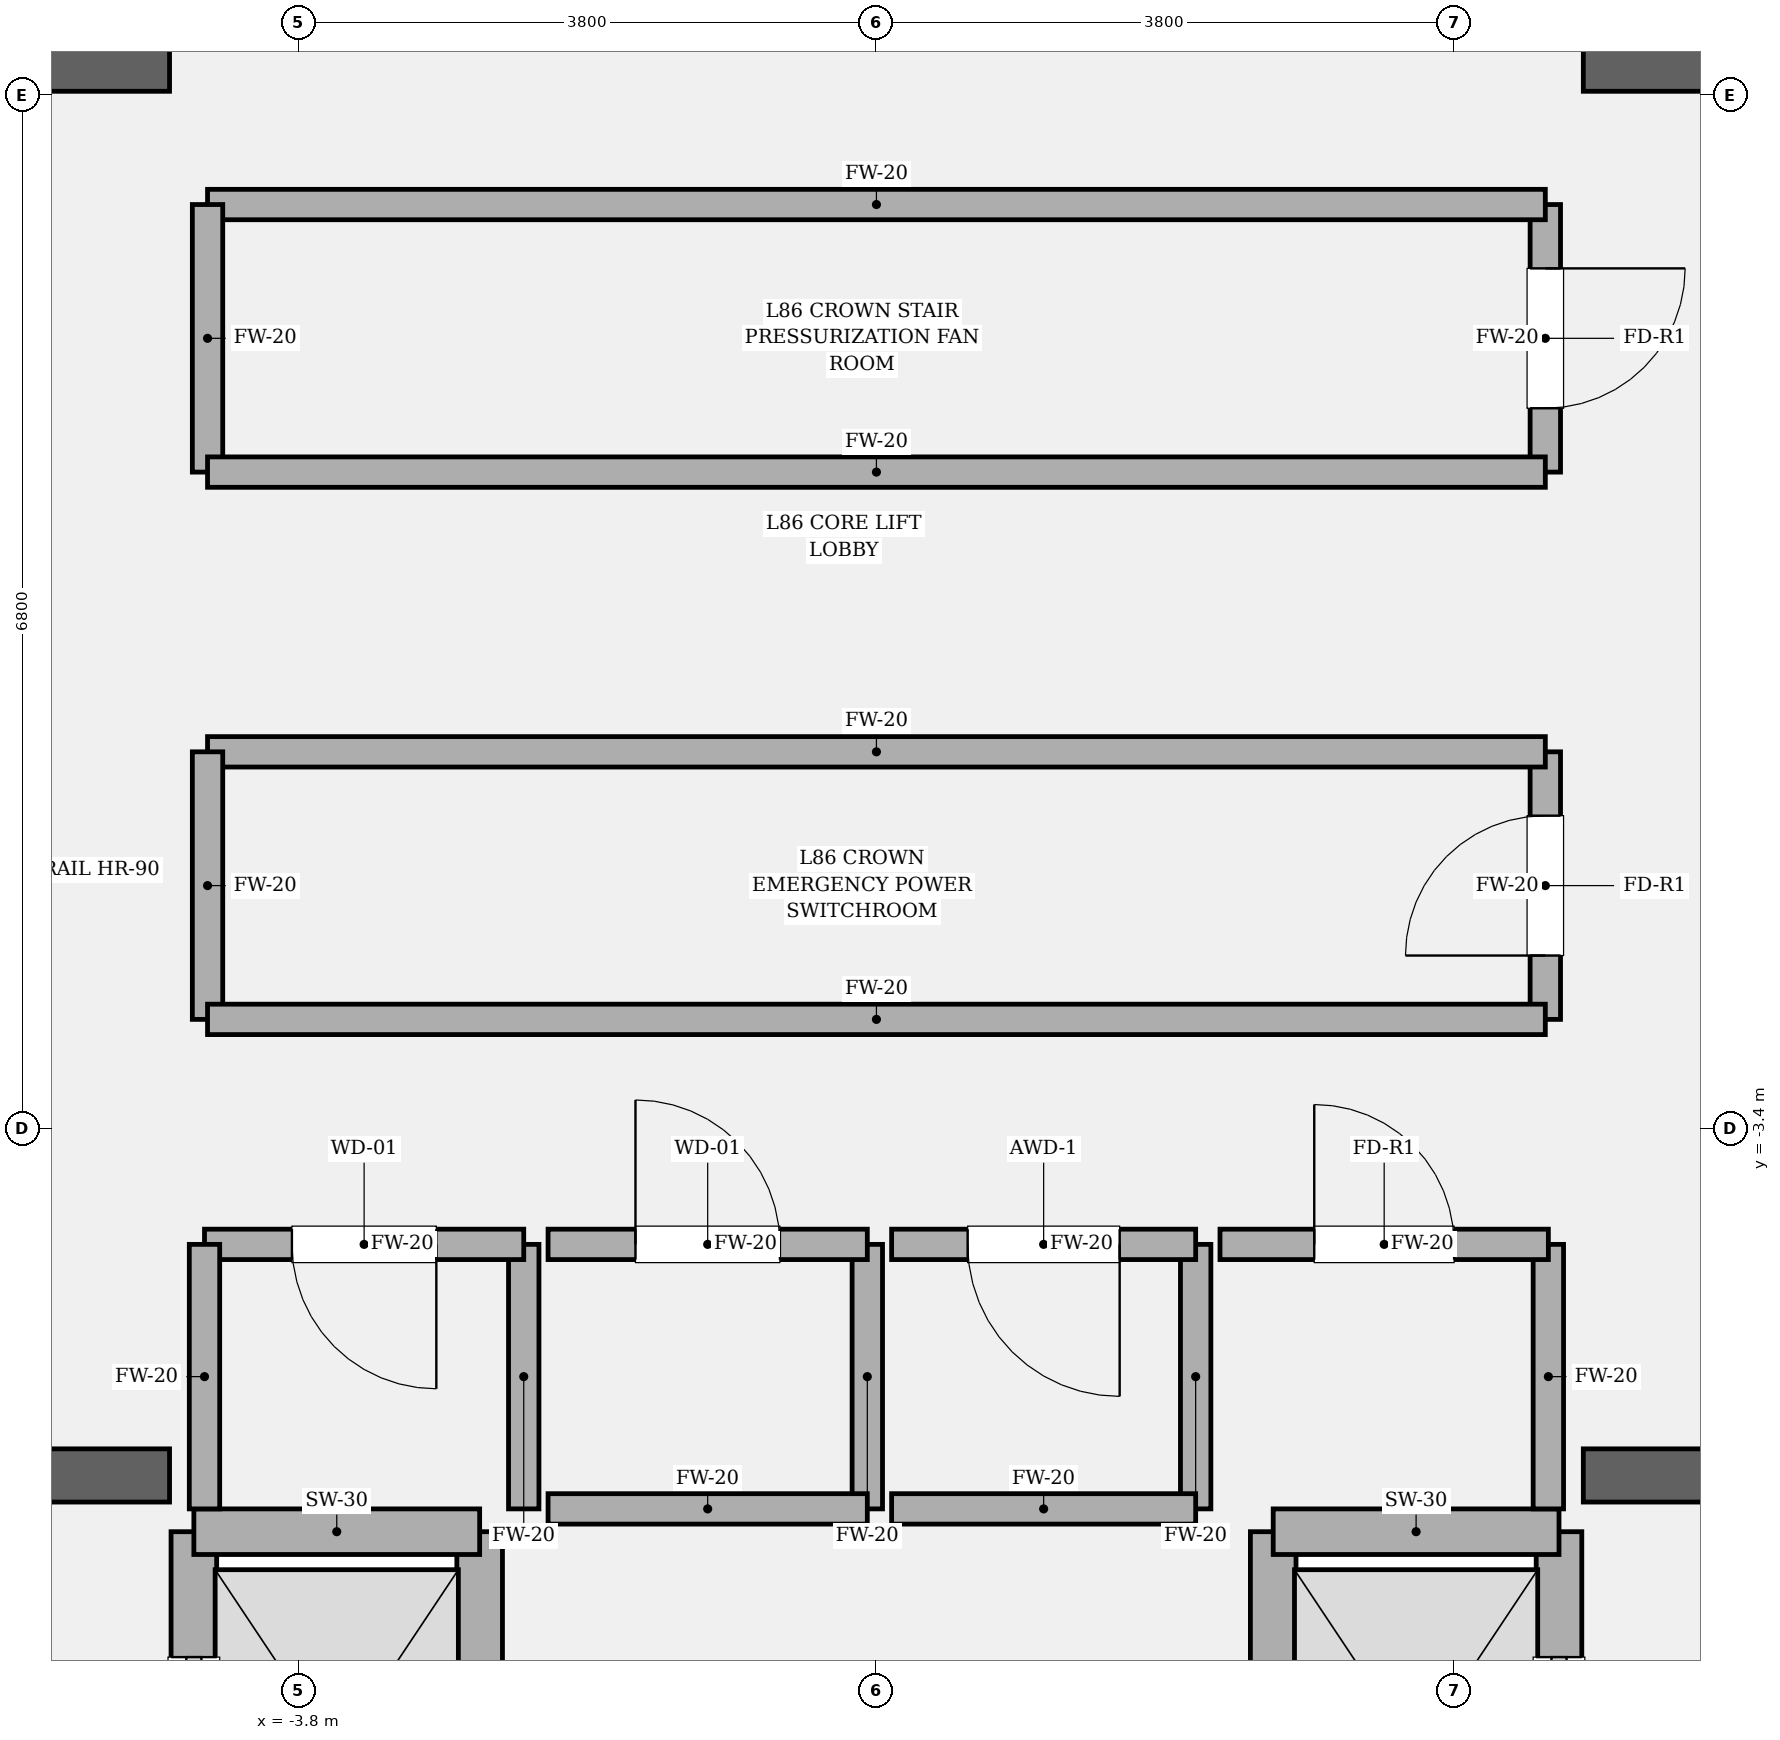
"""IFC4 building model, lengths in metres.
Left out: names, types, materials, properties, quantities, classifications, styles, units other than length and angle.
Written with IfcOpenShell. Run it as: python <this file> out.ifc"""

import sys

from ifc_helpers import new_model, si_unit, direction, frame, frame_2d, origin, place, context, subcontext, project, spatial, rectangle, extrude, element, fill, save


model = new_model("IFC4")
c1 = context("Model", 3, precision=1e-05, world=origin(), true_north=direction((0.0, 1.0)))
c2 = subcontext(c1, "Body", "Model", "MODEL_VIEW")
j1 = project(units=[si_unit("LENGTHUNIT", "METRE"), si_unit("PLANEANGLEUNIT", "RADIAN")], contexts=[c1])
p1 = place(None, origin())
s1 = spatial("IfcSite", under=j1, at=p1, CompositionType="ELEMENT")
p2 = place(p1, origin())
s2 = spatial("IfcBuilding", under=s1, at=p2, CompositionType="ELEMENT")
p3 = place(p2, frame((0.0, 0.0, 366.3)))
s3 = spatial("IfcBuildingStorey", under=s2, at=p3, CompositionType="ELEMENT", Elevation=366.3)
p4 = place(p3, frame((-9.975, -5.68, 0.0), z_axis=(0.0, 0.0, 1.0), x_axis=(1.0, 0.0, 0.0)))
e1 = element("IfcWall", 1, at=p4, inside=s3, PredefinedType="SOLIDWALL", context=c2, shape_type="SweptSolid", body=[
    extrude(rectangle(XDim=5.325, YDim=0.35, at=frame_2d((2.663, 0.0))), origin(), (0.0, 0.0, 1.0), 4.5),
])
p5 = place(p4, frame((1.435, 0.0, 0.0)))
e2 = element("IfcOpeningElement", 2, at=p5, cuts=e1, PredefinedType="OPENING", context=c2, shape_type="SweptSolid", body=[
    extrude(rectangle(XDim=1.18, YDim=2.2, at=frame_2d((0.59, 1.1))), frame((0.0, 0.185, 0.0), z_axis=(0.0, -1.0, 0.0), x_axis=(1.0, 0.0, 0.0)), (0.0, 0.0, 1.0), 0.37),
])
p6 = place(p3, frame((4.65, -5.68, 0.0), z_axis=(0.0, 0.0, 1.0), x_axis=(1.0, 0.0, 0.0)))
e3 = element("IfcWall", 3, at=p6, inside=s3, PredefinedType="SOLIDWALL", context=c2, shape_type="SweptSolid", body=[
    extrude(rectangle(XDim=5.325, YDim=0.35, at=frame_2d((2.663, 0.0))), origin(), (0.0, 0.0, 1.0), 4.5),
])
p7 = place(p6, frame((2.71, 0.0, 0.0)))
e4 = element("IfcOpeningElement", 4, at=p7, cuts=e3, PredefinedType="OPENING", context=c2, shape_type="SweptSolid", body=[
    extrude(rectangle(XDim=1.18, YDim=2.2, at=frame_2d((0.59, 1.1))), frame((0.0, 0.185, 0.0), z_axis=(0.0, -1.0, 0.0), x_axis=(1.0, 0.0, 0.0)), (0.0, 0.0, 1.0), 0.37),
])
for number, where, z_axis, x_axis in (
    (5, (-9.975, 3.6, 0.0), (0.0, 0.0, 1.0), (1.0, 0.0, 0.0)),
    (6, (4.65, 3.6, 0.0), (0.0, 0.0, 1.0), (1.0, 0.0, 0.0)),
):
    element("IfcWall", number, at=place(p3, frame(where, z_axis=z_axis, x_axis=x_axis)), inside=s3, PredefinedType="SOLIDWALL", context=c2, shape_type="SweptSolid", body=[
        extrude(rectangle(XDim=5.325, YDim=0.35, at=frame_2d((2.663, 0.0))), origin(), (0.0, 0.0, 1.0), 4.5),
    ])
p8 = place(p3, frame((-4.49, -8.82, 0.0), z_axis=(0.0, 0.0, 1.0), x_axis=(0.0, 1.0, 0.0)))
e7 = element("IfcWall", 7, at=p8, inside=s3, PredefinedType="SOLIDWALL", context=c2, shape_type="SweptSolid", body=[
    extrude(rectangle(XDim=2.77, YDim=0.3, at=frame_2d((1.385, 0.0))), origin(), (0.0, 0.0, 1.0), 4.25),
])
p9 = place(p8, frame((0.825, 0.0, 0.0)))
e8 = element("IfcOpeningElement", 8, at=p9, cuts=e7, PredefinedType="OPENING", context=c2, shape_type="SweptSolid", body=[
    extrude(rectangle(XDim=1.12, YDim=2.25, at=frame_2d((0.56, 1.125))), frame((0.0, 0.16, 0.0), z_axis=(0.0, -1.0, 0.0), x_axis=(1.0, 0.0, 0.0)), (0.0, 0.0, 1.0), 0.32),
])
p10 = place(p3, frame((-2.61, -8.82, 0.0), z_axis=(0.0, 0.0, 1.0), x_axis=(0.0, 1.0, 0.0)))
e9 = element("IfcWall", 9, at=p10, inside=s3, PredefinedType="SOLIDWALL", context=c2, shape_type="SweptSolid", body=[
    extrude(rectangle(XDim=2.77, YDim=0.3, at=frame_2d((1.385, 0.0))), origin(), (0.0, 0.0, 1.0), 4.25),
])
p11 = place(p3, frame((-4.49, -6.05, 0.0), z_axis=(0.0, 0.0, 1.0), x_axis=(1.0, 0.0, 0.0)))
e10 = element("IfcWall", 10, at=p11, inside=s3, PredefinedType="SOLIDWALL", context=c2, shape_type="SweptSolid", body=[
    extrude(rectangle(XDim=1.88, YDim=0.3, at=frame_2d((0.94, 0.0))), origin(), (0.0, 0.0, 1.0), 4.25),
])
p12 = place(p3, frame((4.49, -8.82, 0.0), z_axis=(0.0, 0.0, 1.0), x_axis=(0.0, 1.0, 0.0)))
e11 = element("IfcWall", 11, at=p12, inside=s3, PredefinedType="SOLIDWALL", context=c2, shape_type="SweptSolid", body=[
    extrude(rectangle(XDim=2.77, YDim=0.3, at=frame_2d((1.385, 0.0))), origin(), (0.0, 0.0, 1.0), 4.25),
])
p13 = place(p12, frame((0.825, 0.0, 0.0)))
e12 = element("IfcOpeningElement", 12, at=p13, cuts=e11, PredefinedType="OPENING", context=c2, shape_type="SweptSolid", body=[
    extrude(rectangle(XDim=1.12, YDim=2.25, at=frame_2d((0.56, 1.125))), frame((0.0, 0.16, 0.0), z_axis=(0.0, -1.0, 0.0), x_axis=(1.0, 0.0, 0.0)), (0.0, 0.0, 1.0), 0.32),
])
p14 = place(p3, frame((2.61, -8.82, 0.0), z_axis=(0.0, 0.0, 1.0), x_axis=(0.0, 1.0, 0.0)))
e13 = element("IfcWall", 13, at=p14, inside=s3, PredefinedType="SOLIDWALL", context=c2, shape_type="SweptSolid", body=[
    extrude(rectangle(XDim=2.77, YDim=0.3, at=frame_2d((1.385, 0.0))), origin(), (0.0, 0.0, 1.0), 4.25),
])
p15 = place(p3, frame((2.61, -6.05, 0.0), z_axis=(0.0, 0.0, 1.0), x_axis=(1.0, 0.0, 0.0)))
e14 = element("IfcWall", 14, at=p15, inside=s3, PredefinedType="SOLIDWALL", context=c2, shape_type="SweptSolid", body=[
    extrude(rectangle(XDim=1.88, YDim=0.3, at=frame_2d((0.94, 0.0))), origin(), (0.0, 0.0, 1.0), 4.25),
])
p16 = place(p3, frame((-2.32, -5.9, 0.0), z_axis=(0.0, 0.0, 1.0), x_axis=(0.0, 1.0, 0.0)))
e15 = element("IfcWall", 15, at=p16, inside=s3, PredefinedType="SOLIDWALL", context=c2, shape_type="SweptSolid", body=[
    extrude(rectangle(XDim=1.74, YDim=0.2, at=frame_2d((0.87, 0.0))), origin(), (0.0, 0.0, 1.0), 4.25),
])
p17 = place(p3, frame((-2.32, -4.16, 0.0), z_axis=(0.0, 0.0, 1.0), x_axis=(-1.0, 0.0, 0.0)))
e16 = element("IfcWall", 16, at=p17, inside=s3, PredefinedType="SOLIDWALL", context=c2, shape_type="SweptSolid", body=[
    extrude(rectangle(XDim=2.1, YDim=0.2, at=frame_2d((1.05, 0.0))), origin(), (0.0, 0.0, 1.0), 4.25),
])
p18 = place(p17, frame((0.575, 0.0, 0.0)))
e17 = element("IfcOpeningElement", 17, at=p18, cuts=e16, PredefinedType="OPENING", context=c2, shape_type="SweptSolid", body=[
    extrude(rectangle(XDim=0.95, YDim=2.15, at=frame_2d((0.475, 1.075))), frame((0.0, 0.11, 0.0), z_axis=(0.0, -1.0, 0.0), x_axis=(1.0, 0.0, 0.0)), (0.0, 0.0, 1.0), 0.22),
])
for number, where, z_axis, x_axis in (
    (18, (-4.42, -4.16, 0.0), (0.0, 0.0, 1.0), (0.0, -1.0, 0.0)),
    (19, (-0.06, -5.9, 0.0), (0.0, 0.0, 1.0), (0.0, 1.0, 0.0)),
):
    element("IfcWall", number, at=place(p3, frame(where, z_axis=z_axis, x_axis=x_axis)), inside=s3, PredefinedType="SOLIDWALL", context=c2, shape_type="SweptSolid", body=[
        extrude(rectangle(XDim=1.74, YDim=0.2, at=frame_2d((0.87, 0.0))), origin(), (0.0, 0.0, 1.0), 4.25),
    ])
p19 = place(p3, frame((-0.06, -4.16, 0.0), z_axis=(0.0, 0.0, 1.0), x_axis=(-1.0, 0.0, 0.0)))
e20 = element("IfcWall", 20, at=p19, inside=s3, PredefinedType="SOLIDWALL", context=c2, shape_type="SweptSolid", body=[
    extrude(rectangle(XDim=2.1, YDim=0.2, at=frame_2d((1.05, 0.0))), origin(), (0.0, 0.0, 1.0), 4.25),
])
p20 = place(p19, frame((0.575, 0.0, 0.0)))
e21 = element("IfcOpeningElement", 21, at=p20, cuts=e20, PredefinedType="OPENING", context=c2, shape_type="SweptSolid", body=[
    extrude(rectangle(XDim=0.95, YDim=2.15, at=frame_2d((0.475, 1.075))), frame((0.0, 0.11, 0.0), z_axis=(0.0, -1.0, 0.0), x_axis=(1.0, 0.0, 0.0)), (0.0, 0.0, 1.0), 0.22),
])
p21 = place(p3, frame((-2.16, -5.9, 0.0), z_axis=(0.0, 0.0, 1.0), x_axis=(1.0, 0.0, 0.0)))
e22 = element("IfcWall", 22, at=p21, inside=s3, PredefinedType="SOLIDWALL", context=c2, shape_type="SweptSolid", body=[
    extrude(rectangle(XDim=2.1, YDim=0.2, at=frame_2d((1.05, 0.0))), origin(), (0.0, 0.0, 1.0), 4.25),
])
p22 = place(p3, frame((2.1, -5.9, 0.0), z_axis=(0.0, 0.0, 1.0), x_axis=(0.0, 1.0, 0.0)))
e23 = element("IfcWall", 23, at=p22, inside=s3, PredefinedType="SOLIDWALL", context=c2, shape_type="SweptSolid", body=[
    extrude(rectangle(XDim=1.74, YDim=0.2, at=frame_2d((0.87, 0.0))), origin(), (0.0, 0.0, 1.0), 4.25),
])
p23 = place(p3, frame((2.1, -4.16, 0.0), z_axis=(0.0, 0.0, 1.0), x_axis=(-1.0, 0.0, 0.0)))
e24 = element("IfcWall", 24, at=p23, inside=s3, PredefinedType="SOLIDWALL", context=c2, shape_type="SweptSolid", body=[
    extrude(rectangle(XDim=2.0, YDim=0.2, at=frame_2d((1.0, 0.0))), origin(), (0.0, 0.0, 1.0), 4.25),
])
p24 = place(p23, frame((0.5, 0.0, 0.0)))
e25 = element("IfcOpeningElement", 25, at=p24, cuts=e24, PredefinedType="OPENING", context=c2, shape_type="SweptSolid", body=[
    extrude(rectangle(XDim=1.0, YDim=2.15, at=frame_2d((0.5, 1.075))), frame((0.0, 0.11, 0.0), z_axis=(0.0, -1.0, 0.0), x_axis=(1.0, 0.0, 0.0)), (0.0, 0.0, 1.0), 0.22),
])
p25 = place(p3, frame((0.1, -5.9, 0.0), z_axis=(0.0, 0.0, 1.0), x_axis=(1.0, 0.0, 0.0)))
e26 = element("IfcWall", 26, at=p25, inside=s3, PredefinedType="SOLIDWALL", context=c2, shape_type="SweptSolid", body=[
    extrude(rectangle(XDim=2.0, YDim=0.2, at=frame_2d((1.0, 0.0))), origin(), (0.0, 0.0, 1.0), 4.25),
])
p26 = place(p3, frame((4.42, -5.9, 0.0), z_axis=(0.0, 0.0, 1.0), x_axis=(0.0, 1.0, 0.0)))
e27 = element("IfcWall", 27, at=p26, inside=s3, PredefinedType="SOLIDWALL", context=c2, shape_type="SweptSolid", body=[
    extrude(rectangle(XDim=1.74, YDim=0.2, at=frame_2d((0.87, 0.0))), origin(), (0.0, 0.0, 1.0), 4.25),
])
p27 = place(p3, frame((4.42, -4.16, 0.0), z_axis=(0.0, 0.0, 1.0), x_axis=(-1.0, 0.0, 0.0)))
e28 = element("IfcWall", 28, at=p27, inside=s3, PredefinedType="SOLIDWALL", context=c2, shape_type="SweptSolid", body=[
    extrude(rectangle(XDim=2.16, YDim=0.2, at=frame_2d((1.08, 0.0))), origin(), (0.0, 0.0, 1.0), 4.25),
])
p28 = place(p27, frame((0.62, 0.0, 0.0)))
e29 = element("IfcOpeningElement", 29, at=p28, cuts=e28, PredefinedType="OPENING", context=c2, shape_type="SweptSolid", body=[
    extrude(rectangle(XDim=0.92, YDim=2.1, at=frame_2d((0.46, 1.05))), frame((0.0, 0.11, 0.0), z_axis=(0.0, -1.0, 0.0), x_axis=(1.0, 0.0, 0.0)), (0.0, 0.0, 1.0), 0.22),
])
p29 = place(p3, frame((4.4, -2.68, 0.0), z_axis=(0.0, 0.0, 1.0), x_axis=(0.0, 1.0, 0.0)))
e30 = element("IfcWall", 30, at=p29, inside=s3, PredefinedType="SOLIDWALL", context=c2, shape_type="SweptSolid", body=[
    extrude(rectangle(XDim=1.76, YDim=0.2, at=frame_2d((0.88, 0.0))), origin(), (0.0, 0.0, 1.0), 4.25),
])
p30 = place(p29, frame((0.42, 0.0, 0.0)))
e31 = element("IfcOpeningElement", 31, at=p30, cuts=e30, PredefinedType="OPENING", context=c2, shape_type="SweptSolid", body=[
    extrude(rectangle(XDim=0.92, YDim=2.1, at=frame_2d((0.46, 1.05))), frame((0.0, 0.11, 0.0), z_axis=(0.0, -1.0, 0.0), x_axis=(1.0, 0.0, 0.0)), (0.0, 0.0, 1.0), 0.22),
])
p31 = place(p3, frame((4.4, -0.92, 0.0), z_axis=(0.0, 0.0, 1.0), x_axis=(-1.0, 0.0, 0.0)))
e32 = element("IfcWall", 32, at=p31, inside=s3, PredefinedType="SOLIDWALL", context=c2, shape_type="SweptSolid", body=[
    extrude(rectangle(XDim=8.8, YDim=0.2, at=frame_2d((4.4, 0.0))), origin(), (0.0, 0.0, 1.0), 4.25),
])
p32 = place(p3, frame((-4.4, -0.92, 0.0), z_axis=(0.0, 0.0, 1.0), x_axis=(0.0, -1.0, 0.0)))
e33 = element("IfcWall", 33, at=p32, inside=s3, PredefinedType="SOLIDWALL", context=c2, shape_type="SweptSolid", body=[
    extrude(rectangle(XDim=1.76, YDim=0.2, at=frame_2d((0.88, 0.0))), origin(), (0.0, 0.0, 1.0), 4.25),
])
p33 = place(p3, frame((-4.4, -2.68, 0.0), z_axis=(0.0, 0.0, 1.0), x_axis=(1.0, 0.0, 0.0)))
e34 = element("IfcWall", 34, at=p33, inside=s3, PredefinedType="SOLIDWALL", context=c2, shape_type="SweptSolid", body=[
    extrude(rectangle(XDim=8.8, YDim=0.2, at=frame_2d((4.4, 0.0))), origin(), (0.0, 0.0, 1.0), 4.25),
])
p34 = place(p3, frame((4.4, 0.92, 0.0), z_axis=(0.0, 0.0, 1.0), x_axis=(0.0, 1.0, 0.0)))
e35 = element("IfcWall", 35, at=p34, inside=s3, PredefinedType="SOLIDWALL", context=c2, shape_type="SweptSolid", body=[
    extrude(rectangle(XDim=1.76, YDim=0.2, at=frame_2d((0.88, 0.0))), origin(), (0.0, 0.0, 1.0), 4.25),
])
p35 = place(p34, frame((0.42, 0.0, 0.0)))
e36 = element("IfcOpeningElement", 36, at=p35, cuts=e35, PredefinedType="OPENING", context=c2, shape_type="SweptSolid", body=[
    extrude(rectangle(XDim=0.92, YDim=2.1, at=frame_2d((0.46, 1.05))), frame((0.0, 0.11, 0.0), z_axis=(0.0, -1.0, 0.0), x_axis=(1.0, 0.0, 0.0)), (0.0, 0.0, 1.0), 0.22),
])
p36 = place(p3, frame((4.4, 2.68, 0.0), z_axis=(0.0, 0.0, 1.0), x_axis=(-1.0, 0.0, 0.0)))
e37 = element("IfcWall", 37, at=p36, inside=s3, PredefinedType="SOLIDWALL", context=c2, shape_type="SweptSolid", body=[
    extrude(rectangle(XDim=8.8, YDim=0.2, at=frame_2d((4.4, 0.0))), origin(), (0.0, 0.0, 1.0), 4.25),
])
p37 = place(p3, frame((-4.4, 2.68, 0.0), z_axis=(0.0, 0.0, 1.0), x_axis=(0.0, -1.0, 0.0)))
e38 = element("IfcWall", 38, at=p37, inside=s3, PredefinedType="SOLIDWALL", context=c2, shape_type="SweptSolid", body=[
    extrude(rectangle(XDim=1.76, YDim=0.2, at=frame_2d((0.88, 0.0))), origin(), (0.0, 0.0, 1.0), 4.25),
])
p38 = place(p3, frame((-4.4, 0.92, 0.0), z_axis=(0.0, 0.0, 1.0), x_axis=(1.0, 0.0, 0.0)))
e39 = element("IfcWall", 39, at=p38, inside=s3, PredefinedType="SOLIDWALL", context=c2, shape_type="SweptSolid", body=[
    extrude(rectangle(XDim=8.8, YDim=0.2, at=frame_2d((4.4, 0.0))), origin(), (0.0, 0.0, 1.0), 4.25),
])
p39 = place(p9, origin())
e40 = element("IfcDoor", 40, at=p39, inside=s3, OperationType="SLIDING_TO_LEFT", PredefinedType="DOOR", context=c2, shape_type="SweptSolid", body=[
    extrude(rectangle(XDim=1.12, YDim=2.25, at=frame_2d((0.56, 1.125))), frame((0.0, 0.025, 0.0), z_axis=(0.0, -1.0, 0.0), x_axis=(1.0, 0.0, 0.0)), (0.0, 0.0, 1.0), 0.05),
])
fill(e8, e40)
p40 = place(p13, origin())
e41 = element("IfcDoor", 41, at=p40, inside=s3, OperationType="SLIDING_TO_RIGHT", PredefinedType="DOOR", context=c2, shape_type="SweptSolid", body=[
    extrude(rectangle(XDim=1.12, YDim=2.25, at=frame_2d((0.56, 1.125))), frame((0.0, 0.025, 0.0), z_axis=(0.0, -1.0, 0.0), x_axis=(1.0, 0.0, 0.0)), (0.0, 0.0, 1.0), 0.05),
])
fill(e12, e41)
p41 = place(p18, origin())
e42 = element("IfcDoor", 42, at=p41, inside=s3, OperationType="SINGLE_SWING_LEFT", PredefinedType="DOOR", context=c2, shape_type="SweptSolid", body=[
    extrude(rectangle(XDim=0.95, YDim=2.15, at=frame_2d((0.475, 1.075))), frame((0.0, 0.025, 0.0), z_axis=(0.0, -1.0, 0.0), x_axis=(1.0, 0.0, 0.0)), (0.0, 0.0, 1.0), 0.05),
])
fill(e17, e42)
p42 = place(p20, origin())
e43 = element("IfcDoor", 43, at=p42, inside=s3, OperationType="SINGLE_SWING_RIGHT", PredefinedType="DOOR", context=c2, shape_type="SweptSolid", body=[
    extrude(rectangle(XDim=0.95, YDim=2.15, at=frame_2d((0.475, 1.075))), frame((0.0, 0.025, 0.0), z_axis=(0.0, -1.0, 0.0), x_axis=(1.0, 0.0, 0.0)), (0.0, 0.0, 1.0), 0.05),
])
fill(e21, e43)
p43 = place(p24, origin())
e44 = element("IfcDoor", 44, at=p43, inside=s3, OperationType="SINGLE_SWING_LEFT", PredefinedType="DOOR", context=c2, shape_type="SweptSolid", body=[
    extrude(rectangle(XDim=1.0, YDim=2.15, at=frame_2d((0.5, 1.075))), frame((0.0, 0.025, 0.0), z_axis=(0.0, -1.0, 0.0), x_axis=(1.0, 0.0, 0.0)), (0.0, 0.0, 1.0), 0.05),
])
fill(e25, e44)
p44 = place(p28, origin())
e45 = element("IfcDoor", 45, at=p44, inside=s3, OperationType="SINGLE_SWING_RIGHT", PredefinedType="DOOR", context=c2, shape_type="SweptSolid", body=[
    extrude(rectangle(XDim=0.92, YDim=2.1, at=frame_2d((0.46, 1.05))), frame((0.0, 0.025, 0.0), z_axis=(0.0, -1.0, 0.0), x_axis=(1.0, 0.0, 0.0)), (0.0, 0.0, 1.0), 0.05),
])
fill(e29, e45)
p45 = place(p30, origin())
e46 = element("IfcDoor", 46, at=p45, inside=s3, OperationType="SINGLE_SWING_LEFT", PredefinedType="DOOR", context=c2, shape_type="SweptSolid", body=[
    extrude(rectangle(XDim=0.92, YDim=2.1, at=frame_2d((0.46, 1.05))), frame((0.0, 0.025, 0.0), z_axis=(0.0, -1.0, 0.0), x_axis=(1.0, 0.0, 0.0)), (0.0, 0.0, 1.0), 0.05),
])
fill(e31, e46)
p46 = place(p35, origin())
e47 = element("IfcDoor", 47, at=p46, inside=s3, OperationType="SINGLE_SWING_RIGHT", PredefinedType="DOOR", context=c2, shape_type="SweptSolid", body=[
    extrude(rectangle(XDim=0.92, YDim=2.1, at=frame_2d((0.46, 1.05))), frame((0.0, 0.025, 0.0), z_axis=(0.0, -1.0, 0.0), x_axis=(1.0, 0.0, 0.0)), (0.0, 0.0, 1.0), 0.05),
])
fill(e36, e47)
save(model, sys.argv[1])
